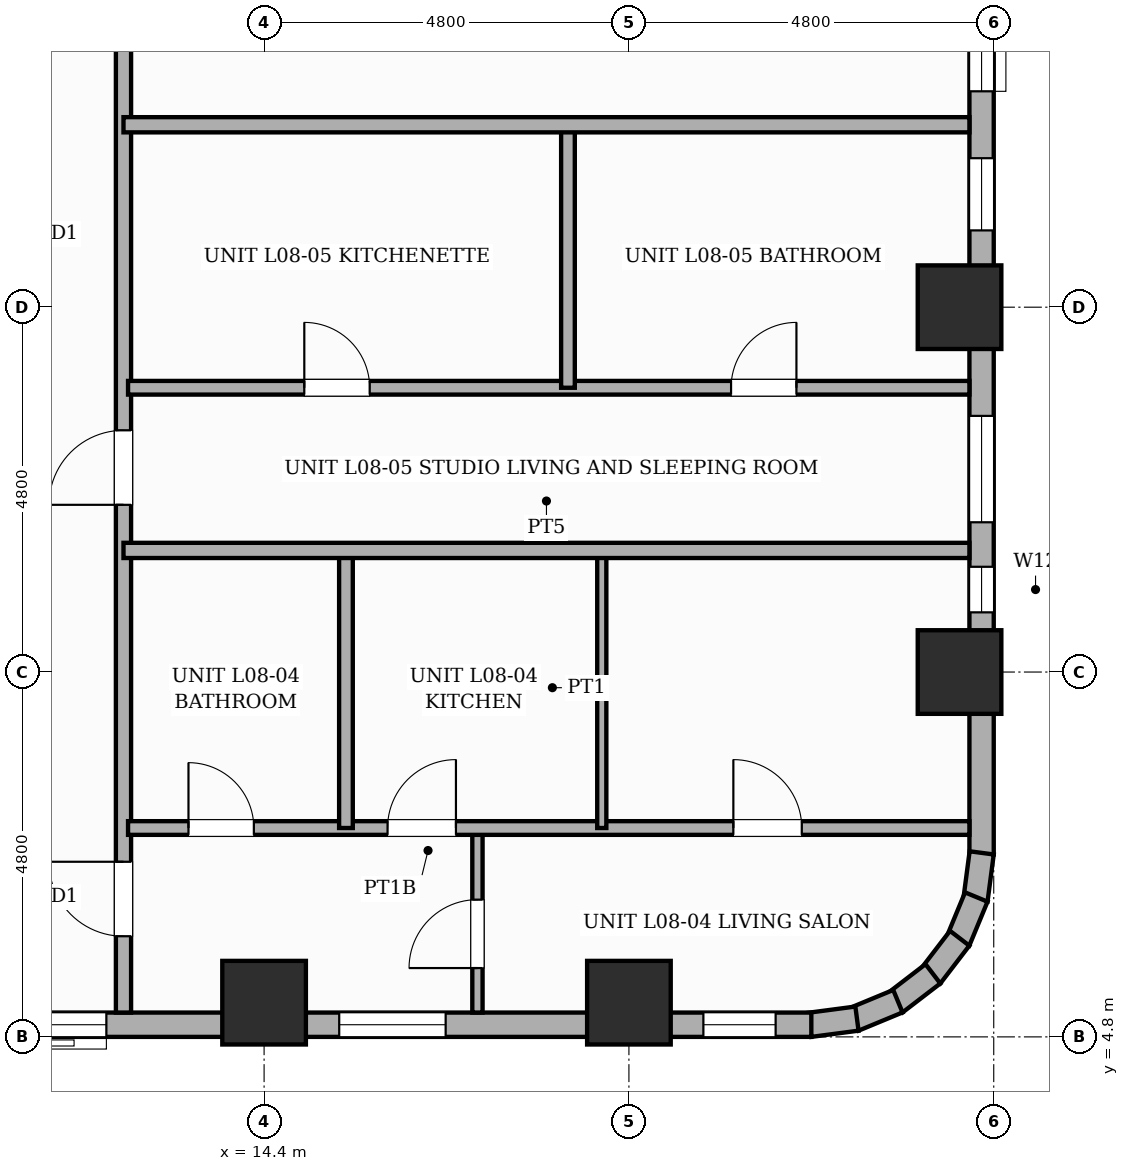
"""IFC4 building model, lengths in metres.
Left out: names, types, materials, properties, quantities, classifications, styles, units other than length and angle.
Written with IfcOpenShell. Run it as: python <this file> out.ifc"""

import sys

from ifc_helpers import new_model, si_unit, direction, frame, frame_2d, origin, origin_2d, place, context, subcontext, project, spatial, rectangle, extrude, element, fill, save


model = new_model("IFC4")
c1 = context("Model", 3, precision=1e-05, world=origin(), true_north=direction((0.0, 1.0)))
c2 = subcontext(c1, "Body", "Model", "MODEL_VIEW")
j1 = project(units=[si_unit("LENGTHUNIT", "METRE"), si_unit("PLANEANGLEUNIT", "RADIAN")], contexts=[c1])
p1 = place(None, origin())
s1 = spatial("IfcSite", under=j1, at=p1, CompositionType="ELEMENT")
p2 = place(p1, origin())
s2 = spatial("IfcBuilding", under=s1, at=p2, CompositionType="ELEMENT")
p3 = place(p2, frame((0.0, 0.0, 35.8)))
s3 = spatial("IfcBuildingStorey", under=s2, at=p3, CompositionType="ELEMENT", Elevation=35.8)
for number, where, z_axis, x_axis in (
    (1, (14.4, 5.25, 0.0), (0.0, 0.0, 1.0), (1.0, 0.0, 0.0)),
    (2, (19.2, 5.25, 0.0), (0.0, 0.0, 1.0), (1.0, 0.0, 0.0)),
    (3, (23.55, 9.6, 0.0), (0.0, 0.0, 1.0), (1.0, 0.0, 0.0)),
    (4, (23.55, 14.4, 0.0), (0.0, 0.0, 1.0), (1.0, 0.0, 0.0)),
):
    element("IfcColumn", number, at=place(p3, frame(where, z_axis=z_axis, x_axis=x_axis)), inside=s3, PredefinedType="COLUMN", context=c2, shape_type="SweptSolid", body=[
        extrude(rectangle(XDim=1.1, YDim=1.1, at=origin_2d()), origin(), (0.0, 0.0, 1.0), 3.6),
    ])
p4 = place(p3, frame((23.84, 26.4, 0.0), z_axis=(0.0, 0.0, 1.0), x_axis=(0.0, -1.0, 0.0)))
e5 = element("IfcWall", 5, at=p4, inside=s3, PredefinedType="STANDARD", context=c2, shape_type="SweptSolid", body=[
    extrude(rectangle(XDim=19.2, YDim=0.32, at=frame_2d((9.6, 0.0))), origin(), (0.0, 0.0, 1.0), 2.53),
])
p5 = place(p4, frame((15.415, 0.0, 0.45)))
e6 = element("IfcOpeningElement", 6, at=p5, cuts=e5, PredefinedType="OPENING", context=c2, shape_type="SweptSolid", body=[
    extrude(rectangle(XDim=0.6, YDim=1.8, at=frame_2d((0.3, 0.9))), frame((0.0, 0.17, 0.0), z_axis=(0.0, -1.0, 0.0), x_axis=(1.0, 0.0, 0.0)), (0.0, 0.0, 1.0), 0.34),
])
p6 = place(p4, frame((13.43, 0.0, 0.65)))
e7 = element("IfcOpeningElement", 7, at=p6, cuts=e5, PredefinedType="OPENING", context=c2, shape_type="SweptSolid", body=[
    extrude(rectangle(XDim=1.4, YDim=1.1, at=frame_2d((0.7, 0.55))), frame((0.0, 0.17, 0.0), z_axis=(0.0, -1.0, 0.0), x_axis=(1.0, 0.0, 0.0)), (0.0, 0.0, 1.0), 0.34),
])
p7 = place(p4, frame((8.21, 0.0, 0.45)))
e8 = element("IfcOpeningElement", 8, at=p7, cuts=e5, PredefinedType="OPENING", context=c2, shape_type="SweptSolid", body=[
    extrude(rectangle(XDim=0.95, YDim=1.8, at=frame_2d((0.475, 0.9))), frame((0.0, 0.17, 0.0), z_axis=(0.0, -1.0, 0.0), x_axis=(1.0, 0.0, 0.0)), (0.0, 0.0, 1.0), 0.34),
])
p8 = place(p4, frame((3.285, 0.0, 0.65)))
e9 = element("IfcOpeningElement", 9, at=p8, cuts=e5, PredefinedType="OPENING", context=c2, shape_type="SweptSolid", body=[
    extrude(rectangle(XDim=1.4, YDim=1.1, at=frame_2d((0.7, 0.55))), frame((0.0, 0.17, 0.0), z_axis=(0.0, -1.0, 0.0), x_axis=(1.0, 0.0, 0.0)), (0.0, 0.0, 1.0), 0.34),
])
p9 = place(p4, frame((10.04, 0.0, 0.45)))
e10 = element("IfcOpeningElement", 10, at=p9, cuts=e5, PredefinedType="OPENING", context=c2, shape_type="SweptSolid", body=[
    extrude(rectangle(XDim=0.95, YDim=1.8, at=frame_2d((0.475, 0.9))), frame((0.0, 0.17, 0.0), z_axis=(0.0, -1.0, 0.0), x_axis=(1.0, 0.0, 0.0)), (0.0, 0.0, 1.0), 0.34),
])
p10 = place(p4, frame((5.32, 0.0, 0.45)))
e11 = element("IfcOpeningElement", 11, at=p10, cuts=e5, PredefinedType="OPENING", context=c2, shape_type="SweptSolid", body=[
    extrude(rectangle(XDim=0.95, YDim=1.8, at=frame_2d((0.475, 0.9))), frame((0.0, 0.17, 0.0), z_axis=(0.0, -1.0, 0.0), x_axis=(1.0, 0.0, 0.0)), (0.0, 0.0, 1.0), 0.34),
])
p11 = place(p4, frame((0.88, 0.0, 0.45)))
e12 = element("IfcOpeningElement", 12, at=p11, cuts=e5, PredefinedType="OPENING", context=c2, shape_type="SweptSolid", body=[
    extrude(rectangle(XDim=0.75, YDim=1.8, at=frame_2d((0.375, 0.9))), frame((0.0, 0.17, 0.0), z_axis=(0.0, -1.0, 0.0), x_axis=(1.0, 0.0, 0.0)), (0.0, 0.0, 1.0), 0.34),
])
p12 = place(p3, frame((23.841, 7.221, 0.0), z_axis=(0.0, 0.0, 1.0), x_axis=(-0.130504898859, -0.991447664465, 0.0)))
e13 = element("IfcWall", 13, at=p12, inside=s3, PredefinedType="STANDARD", context=c2, shape_type="SweptSolid", body=[
    extrude(rectangle(XDim=0.627, YDim=0.32, at=frame_2d((0.313, 0.0))), origin(), (0.0, 0.0, 1.0), 3.35),
])
p13 = place(p3, frame((23.771, 6.64, 0.0), z_axis=(0.0, 0.0, 1.0), x_axis=(-0.382787856107, -0.923836271867, 0.0)))
e14 = element("IfcWall", 14, at=p13, inside=s3, PredefinedType="STANDARD", context=c2, shape_type="SweptSolid", body=[
    extrude(rectangle(XDim=0.626, YDim=0.32, at=frame_2d((0.313, 0.0))), origin(), (0.0, 0.0, 1.0), 3.35),
])
p14 = place(p3, frame((23.552, 6.097, 0.0), z_axis=(0.0, 0.0, 1.0), x_axis=(-0.608693302629, -0.793405610854, 0.0)))
e15 = element("IfcWall", 15, at=p14, inside=s3, PredefinedType="STANDARD", context=c2, shape_type="SweptSolid", body=[
    extrude(rectangle(XDim=0.626, YDim=0.32, at=frame_2d((0.313, 0.0))), origin(), (0.0, 0.0, 1.0), 3.35),
])
p15 = place(p3, frame((23.2, 5.63, 0.0), z_axis=(0.0, 0.0, 1.0), x_axis=(-0.7932174212, -0.608938521285, 0.0)))
e16 = element("IfcWall", 16, at=p15, inside=s3, PredefinedType="STANDARD", context=c2, shape_type="SweptSolid", body=[
    extrude(rectangle(XDim=0.627, YDim=0.32, at=frame_2d((0.313, 0.0))), origin(), (0.0, 0.0, 1.0), 3.35),
])
for number, where, z_axis, x_axis in (
    (17, (22.739, 5.269, 0.0), (0.0, 0.0, 1.0), (-0.924, -0.383, 0.0)),
    (18, (22.2, 5.04, 0.0), (0.0, 0.0, 1.0), (-0.991, -0.131, 0.0)),
):
    element("IfcWall", number, at=place(p3, frame(where, z_axis=z_axis, x_axis=x_axis)), inside=s3, PredefinedType="STANDARD", context=c2, shape_type="SweptSolid", body=[
        extrude(rectangle(XDim=0.626, YDim=0.32, at=frame_2d((0.313, 0.0))), origin(), (0.0, 0.0, 1.0), 3.35),
    ])
p16 = place(p3, frame((21.6, 4.96, 0.0), z_axis=(0.0, 0.0, 1.0), x_axis=(-1.0, 0.0, 0.0)))
e19 = element("IfcWall", 19, at=p16, inside=s3, PredefinedType="STANDARD", context=c2, shape_type="SweptSolid", body=[
    extrude(rectangle(XDim=14.4, YDim=0.32, at=frame_2d((7.2, 0.0))), origin(), (0.0, 0.0, 1.0), 2.53),
])
p17 = place(p16, frame((12.98, 0.0, 0.45)))
e20 = element("IfcOpeningElement", 20, at=p17, cuts=e19, PredefinedType="OPENING", context=c2, shape_type="SweptSolid", body=[
    extrude(rectangle(XDim=0.95, YDim=1.8, at=frame_2d((0.475, 0.9))), frame((0.0, 0.17, 0.0), z_axis=(0.0, -1.0, 0.0), x_axis=(1.0, 0.0, 0.0)), (0.0, 0.0, 1.0), 0.34),
])
p18 = place(p16, frame((9.275, 0.0, 0.65)))
e21 = element("IfcOpeningElement", 21, at=p18, cuts=e19, PredefinedType="OPENING", context=c2, shape_type="SweptSolid", body=[
    extrude(rectangle(XDim=1.4, YDim=1.1, at=frame_2d((0.7, 0.55))), frame((0.0, 0.17, 0.0), z_axis=(0.0, -1.0, 0.0), x_axis=(1.0, 0.0, 0.0)), (0.0, 0.0, 1.0), 0.34),
])
p19 = place(p16, frame((4.812, 0.0, 0.65)))
e22 = element("IfcOpeningElement", 22, at=p19, cuts=e19, PredefinedType="OPENING", context=c2, shape_type="SweptSolid", body=[
    extrude(rectangle(XDim=1.4, YDim=1.1, at=frame_2d((0.7, 0.55))), frame((0.0, 0.17, 0.0), z_axis=(0.0, -1.0, 0.0), x_axis=(1.0, 0.0, 0.0)), (0.0, 0.0, 1.0), 0.34),
])
p20 = place(p16, frame((0.47, 0.0, 0.45)))
e23 = element("IfcOpeningElement", 23, at=p20, cuts=e19, PredefinedType="OPENING", context=c2, shape_type="SweptSolid", body=[
    extrude(rectangle(XDim=0.95, YDim=1.8, at=frame_2d((0.475, 0.9))), frame((0.0, 0.17, 0.0), z_axis=(0.0, -1.0, 0.0), x_axis=(1.0, 0.0, 0.0)), (0.0, 0.0, 1.0), 0.34),
])
p21 = place(p3, frame((12.55, 5.12, 0.0), z_axis=(0.0, 0.0, 1.0), x_axis=(0.0, 1.0, 0.0)))
e24 = element("IfcWall", 24, at=p21, inside=s3, PredefinedType="PARTITIONING", context=c2, shape_type="SweptSolid", body=[
    extrude(rectangle(XDim=20.63, YDim=0.2, at=frame_2d((10.315, 0.0))), origin(), (0.0, 0.0, 1.0), 3.35),
])
p22 = place(p21, frame((1.004, 0.0, 0.0)))
e25 = element("IfcOpeningElement", 25, at=p22, cuts=e24, PredefinedType="OPENING", context=c2, shape_type="SweptSolid", body=[
    extrude(rectangle(XDim=0.98, YDim=2.18, at=frame_2d((0.49, 1.09))), frame((0.0, 0.11, 0.0), z_axis=(0.0, -1.0, 0.0), x_axis=(1.0, 0.0, 0.0)), (0.0, 0.0, 1.0), 0.22),
])
p23 = place(p21, frame((6.68, 0.0, 0.0)))
e26 = element("IfcOpeningElement", 26, at=p23, cuts=e24, PredefinedType="OPENING", context=c2, shape_type="SweptSolid", body=[
    extrude(rectangle(XDim=0.98, YDim=2.18, at=frame_2d((0.49, 1.09))), frame((0.0, 0.11, 0.0), z_axis=(0.0, -1.0, 0.0), x_axis=(1.0, 0.0, 0.0)), (0.0, 0.0, 1.0), 0.22),
])
p24 = place(p21, frame((12.715, 0.0, 0.0)))
e27 = element("IfcOpeningElement", 27, at=p24, cuts=e24, PredefinedType="OPENING", context=c2, shape_type="SweptSolid", body=[
    extrude(rectangle(XDim=0.98, YDim=2.18, at=frame_2d((0.49, 1.09))), frame((0.0, 0.11, 0.0), z_axis=(0.0, -1.0, 0.0), x_axis=(1.0, 0.0, 0.0)), (0.0, 0.0, 1.0), 0.22),
])
p25 = place(p21, frame((16.88, 0.0, 0.0)))
e28 = element("IfcOpeningElement", 28, at=p25, cuts=e24, PredefinedType="OPENING", context=c2, shape_type="SweptSolid", body=[
    extrude(rectangle(XDim=0.98, YDim=2.18, at=frame_2d((0.49, 1.09))), frame((0.0, 0.11, 0.0), z_axis=(0.0, -1.0, 0.0), x_axis=(1.0, 0.0, 0.0)), (0.0, 0.0, 1.0), 0.22),
])
p26 = place(p3, frame((17.207, 5.12, 0.0), z_axis=(0.0, 0.0, 1.0), x_axis=(0.0, 1.0, 0.0)))
e29 = element("IfcWall", 29, at=p26, inside=s3, PredefinedType="PARTITIONING", context=c2, shape_type="SweptSolid", body=[
    extrude(rectangle(XDim=2.428, YDim=0.135, at=frame_2d((1.214, 0.0))), origin(), (0.0, 0.0, 1.0), 3.35),
])
p27 = place(p26, frame((0.586, 0.0, 0.0)))
e30 = element("IfcOpeningElement", 30, at=p27, cuts=e29, PredefinedType="OPENING", context=c2, shape_type="SweptSolid", body=[
    extrude(rectangle(XDim=0.9, YDim=2.15, at=frame_2d((0.45, 1.075))), frame((0.0, 0.078, 0.0), z_axis=(0.0, -1.0, 0.0), x_axis=(1.0, 0.0, 0.0)), (0.0, 0.0, 1.0), 0.155),
])
p28 = place(p3, frame((12.61, 7.548, 0.0), z_axis=(0.0, 0.0, 1.0), x_axis=(1.0, 0.0, 0.0)))
e31 = element("IfcWall", 31, at=p28, inside=s3, PredefinedType="PLUMBINGWALL", context=c2, shape_type="SweptSolid", body=[
    extrude(rectangle(XDim=11.07, YDim=0.18, at=frame_2d((5.535, 0.0))), origin(), (0.0, 0.0, 1.0), 3.35),
])
p29 = place(p28, frame((0.795, 0.0, 0.0)))
e32 = element("IfcOpeningElement", 32, at=p29, cuts=e31, PredefinedType="OPENING", context=c2, shape_type="SweptSolid", body=[
    extrude(rectangle(XDim=0.86, YDim=2.1, at=frame_2d((0.43, 1.05))), frame((0.0, 0.1, 0.0), z_axis=(0.0, -1.0, 0.0), x_axis=(1.0, 0.0, 0.0)), (0.0, 0.0, 1.0), 0.2),
])
p30 = place(p28, frame((3.414, 0.0, 0.0)))
e33 = element("IfcOpeningElement", 33, at=p30, cuts=e31, PredefinedType="OPENING", context=c2, shape_type="SweptSolid", body=[
    extrude(rectangle(XDim=0.9, YDim=2.15, at=frame_2d((0.45, 1.075))), frame((0.0, 0.1, 0.0), z_axis=(0.0, -1.0, 0.0), x_axis=(1.0, 0.0, 0.0)), (0.0, 0.0, 1.0), 0.2),
])
p31 = place(p28, frame((7.964, 0.0, 0.0)))
e34 = element("IfcOpeningElement", 34, at=p31, cuts=e31, PredefinedType="OPENING", context=c2, shape_type="SweptSolid", body=[
    extrude(rectangle(XDim=0.9, YDim=2.15, at=frame_2d((0.45, 1.075))), frame((0.0, 0.1, 0.0), z_axis=(0.0, -1.0, 0.0), x_axis=(1.0, 0.0, 0.0)), (0.0, 0.0, 1.0), 0.2),
])
p32 = place(p3, frame((15.477, 7.548, 0.0), z_axis=(0.0, 0.0, 1.0), x_axis=(0.0, 1.0, 0.0)))
e35 = element("IfcWall", 35, at=p32, inside=s3, PredefinedType="PLUMBINGWALL", context=c2, shape_type="SweptSolid", body=[
    extrude(rectangle(XDim=3.692, YDim=0.18, at=frame_2d((1.846, 0.0))), origin(), (0.0, 0.0, 1.0), 3.35),
])
p33 = place(p3, frame((18.843, 7.548, 0.0), z_axis=(0.0, 0.0, 1.0), x_axis=(0.0, 1.0, 0.0)))
e36 = element("IfcWall", 36, at=p33, inside=s3, PredefinedType="PARTITIONING", context=c2, shape_type="SweptSolid", body=[
    extrude(rectangle(XDim=3.692, YDim=0.12, at=frame_2d((1.846, 0.0))), origin(), (0.0, 0.0, 1.0), 3.35),
])
p34 = place(p3, frame((12.55, 11.2, 0.0), z_axis=(0.0, 0.0, 1.0), x_axis=(1.0, 0.0, 0.0)))
e37 = element("IfcWall", 37, at=p34, inside=s3, PredefinedType="SOLIDWALL", context=c2, shape_type="SweptSolid", body=[
    extrude(rectangle(XDim=11.13, YDim=0.2, at=frame_2d((5.565, 0.0))), origin(), (0.0, 0.0, 1.0), 3.35),
])
p35 = place(p3, frame((12.61, 13.34, 0.0), z_axis=(0.0, 0.0, 1.0), x_axis=(1.0, 0.0, 0.0)))
e38 = element("IfcWall", 38, at=p35, inside=s3, PredefinedType="PLUMBINGWALL", context=c2, shape_type="SweptSolid", body=[
    extrude(rectangle(XDim=11.07, YDim=0.18, at=frame_2d((5.535, 0.0))), origin(), (0.0, 0.0, 1.0), 3.35),
])
p36 = place(p35, frame((2.319, 0.0, 0.0)))
e39 = element("IfcOpeningElement", 39, at=p36, cuts=e38, PredefinedType="OPENING", context=c2, shape_type="SweptSolid", body=[
    extrude(rectangle(XDim=0.86, YDim=2.1, at=frame_2d((0.43, 1.05))), frame((0.0, 0.1, 0.0), z_axis=(0.0, -1.0, 0.0), x_axis=(1.0, 0.0, 0.0)), (0.0, 0.0, 1.0), 0.2),
])
p37 = place(p35, frame((7.934, 0.0, 0.0)))
e40 = element("IfcOpeningElement", 40, at=p37, cuts=e38, PredefinedType="OPENING", context=c2, shape_type="SweptSolid", body=[
    extrude(rectangle(XDim=0.86, YDim=2.1, at=frame_2d((0.43, 1.05))), frame((0.0, 0.1, 0.0), z_axis=(0.0, -1.0, 0.0), x_axis=(1.0, 0.0, 0.0)), (0.0, 0.0, 1.0), 0.2),
])
p38 = place(p3, frame((18.398, 13.34, 0.0), z_axis=(0.0, 0.0, 1.0), x_axis=(0.0, 1.0, 0.0)))
e41 = element("IfcWall", 41, at=p38, inside=s3, PredefinedType="PLUMBINGWALL", context=c2, shape_type="SweptSolid", body=[
    extrude(rectangle(XDim=3.5, YDim=0.18, at=frame_2d((1.75, 0.0))), origin(), (0.0, 0.0, 1.0), 3.35),
])
p39 = place(p3, frame((12.55, 16.8, 0.0), z_axis=(0.0, 0.0, 1.0), x_axis=(1.0, 0.0, 0.0)))
e42 = element("IfcWall", 42, at=p39, inside=s3, PredefinedType="SOLIDWALL", context=c2, shape_type="SweptSolid", body=[
    extrude(rectangle(XDim=11.13, YDim=0.2, at=frame_2d((5.565, 0.0))), origin(), (0.0, 0.0, 1.0), 3.35),
])
p40 = place(p5, origin())
e43 = element("IfcWindow", 43, at=p40, inside=s3, PartitioningType="SINGLE_PANEL", PredefinedType="WINDOW", context=c2, shape_type="SweptSolid", body=[
    extrude(rectangle(XDim=0.6, YDim=1.8, at=frame_2d((0.3, 0.9))), frame((0.0, 0.03, 0.0), z_axis=(0.0, -1.0, 0.0), x_axis=(1.0, 0.0, 0.0)), (0.0, 0.0, 1.0), 0.06),
])
fill(e6, e43)
p41 = place(p6, origin())
e44 = element("IfcWindow", 44, at=p41, inside=s3, PartitioningType="SINGLE_PANEL", PredefinedType="WINDOW", context=c2, shape_type="SweptSolid", body=[
    extrude(rectangle(XDim=1.4, YDim=1.1, at=frame_2d((0.7, 0.55))), frame((0.0, 0.03, 0.0), z_axis=(0.0, -1.0, 0.0), x_axis=(1.0, 0.0, 0.0)), (0.0, 0.0, 1.0), 0.06),
])
fill(e7, e44)
p42 = place(p7, origin())
e45 = element("IfcWindow", 45, at=p42, inside=s3, PartitioningType="SINGLE_PANEL", PredefinedType="WINDOW", context=c2, shape_type="SweptSolid", body=[
    extrude(rectangle(XDim=0.95, YDim=1.8, at=frame_2d((0.475, 0.9))), frame((0.0, 0.03, 0.0), z_axis=(0.0, -1.0, 0.0), x_axis=(1.0, 0.0, 0.0)), (0.0, 0.0, 1.0), 0.06),
])
fill(e8, e45)
p43 = place(p9, origin())
e46 = element("IfcWindow", 46, at=p43, inside=s3, PartitioningType="SINGLE_PANEL", PredefinedType="WINDOW", context=c2, shape_type="SweptSolid", body=[
    extrude(rectangle(XDim=0.95, YDim=1.8, at=frame_2d((0.475, 0.9))), frame((0.0, 0.03, 0.0), z_axis=(0.0, -1.0, 0.0), x_axis=(1.0, 0.0, 0.0)), (0.0, 0.0, 1.0), 0.06),
])
fill(e10, e46)
p44 = place(p18, origin())
e47 = element("IfcWindow", 47, at=p44, inside=s3, PartitioningType="SINGLE_PANEL", PredefinedType="WINDOW", context=c2, shape_type="SweptSolid", body=[
    extrude(rectangle(XDim=1.4, YDim=1.1, at=frame_2d((0.7, 0.55))), frame((0.0, 0.03, 0.0), z_axis=(0.0, -1.0, 0.0), x_axis=(1.0, 0.0, 0.0)), (0.0, 0.0, 1.0), 0.06),
])
fill(e21, e47)
p45 = place(p19, origin())
e48 = element("IfcWindow", 48, at=p45, inside=s3, PartitioningType="SINGLE_PANEL", PredefinedType="WINDOW", context=c2, shape_type="SweptSolid", body=[
    extrude(rectangle(XDim=1.4, YDim=1.1, at=frame_2d((0.7, 0.55))), frame((0.0, 0.03, 0.0), z_axis=(0.0, -1.0, 0.0), x_axis=(1.0, 0.0, 0.0)), (0.0, 0.0, 1.0), 0.06),
])
fill(e22, e48)
p46 = place(p20, origin())
e49 = element("IfcWindow", 49, at=p46, inside=s3, PartitioningType="SINGLE_PANEL", PredefinedType="WINDOW", context=c2, shape_type="SweptSolid", body=[
    extrude(rectangle(XDim=0.95, YDim=1.8, at=frame_2d((0.475, 0.9))), frame((0.0, 0.03, 0.0), z_axis=(0.0, -1.0, 0.0), x_axis=(1.0, 0.0, 0.0)), (0.0, 0.0, 1.0), 0.06),
])
fill(e23, e49)
p47 = place(p22, origin())
e50 = element("IfcDoor", 50, at=p47, inside=s3, OperationType="SINGLE_SWING_RIGHT", PredefinedType="DOOR", context=c2, shape_type="SweptSolid", body=[
    extrude(rectangle(XDim=0.98, YDim=2.18, at=frame_2d((0.49, 1.09))), frame((0.0, 0.025, 0.0), z_axis=(0.0, -1.0, 0.0), x_axis=(1.0, 0.0, 0.0)), (0.0, 0.0, 1.0), 0.05),
])
fill(e25, e50)
p48 = place(p27, origin())
e51 = element("IfcDoor", 51, at=p48, inside=s3, OperationType="SINGLE_SWING_LEFT", PredefinedType="DOOR", context=c2, shape_type="SweptSolid", body=[
    extrude(rectangle(XDim=0.9, YDim=2.15, at=frame_2d((0.45, 1.075))), frame((0.0, 0.025, 0.0), z_axis=(0.0, -1.0, 0.0), x_axis=(1.0, 0.0, 0.0)), (0.0, 0.0, 1.0), 0.05),
])
fill(e30, e51)
p49 = place(p29, origin())
e52 = element("IfcDoor", 52, at=p49, inside=s3, OperationType="SINGLE_SWING_LEFT", PredefinedType="DOOR", context=c2, shape_type="SweptSolid", body=[
    extrude(rectangle(XDim=0.86, YDim=2.1, at=frame_2d((0.43, 1.05))), frame((0.0, 0.025, 0.0), z_axis=(0.0, -1.0, 0.0), x_axis=(1.0, 0.0, 0.0)), (0.0, 0.0, 1.0), 0.05),
])
fill(e32, e52)
p50 = place(p30, origin())
e53 = element("IfcDoor", 53, at=p50, inside=s3, OperationType="SINGLE_SWING_RIGHT", PredefinedType="DOOR", context=c2, shape_type="SweptSolid", body=[
    extrude(rectangle(XDim=0.9, YDim=2.15, at=frame_2d((0.45, 1.075))), frame((0.0, 0.025, 0.0), z_axis=(0.0, -1.0, 0.0), x_axis=(1.0, 0.0, 0.0)), (0.0, 0.0, 1.0), 0.05),
])
fill(e33, e53)
p51 = place(p31, origin())
e54 = element("IfcDoor", 54, at=p51, inside=s3, OperationType="SINGLE_SWING_LEFT", PredefinedType="DOOR", context=c2, shape_type="SweptSolid", body=[
    extrude(rectangle(XDim=0.9, YDim=2.15, at=frame_2d((0.45, 1.075))), frame((0.0, 0.025, 0.0), z_axis=(0.0, -1.0, 0.0), x_axis=(1.0, 0.0, 0.0)), (0.0, 0.0, 1.0), 0.05),
])
fill(e34, e54)
p52 = place(p23, origin())
e55 = element("IfcDoor", 55, at=p52, inside=s3, OperationType="SINGLE_SWING_LEFT", PredefinedType="DOOR", context=c2, shape_type="SweptSolid", body=[
    extrude(rectangle(XDim=0.98, YDim=2.18, at=frame_2d((0.49, 1.09))), frame((0.0, 0.025, 0.0), z_axis=(0.0, -1.0, 0.0), x_axis=(1.0, 0.0, 0.0)), (0.0, 0.0, 1.0), 0.05),
])
fill(e26, e55)
p53 = place(p36, origin())
e56 = element("IfcDoor", 56, at=p53, inside=s3, OperationType="SINGLE_SWING_LEFT", PredefinedType="DOOR", context=c2, shape_type="SweptSolid", body=[
    extrude(rectangle(XDim=0.86, YDim=2.1, at=frame_2d((0.43, 1.05))), frame((0.0, 0.025, 0.0), z_axis=(0.0, -1.0, 0.0), x_axis=(1.0, 0.0, 0.0)), (0.0, 0.0, 1.0), 0.05),
])
fill(e39, e56)
p54 = place(p37, origin())
e57 = element("IfcDoor", 57, at=p54, inside=s3, OperationType="SINGLE_SWING_RIGHT", PredefinedType="DOOR", context=c2, shape_type="SweptSolid", body=[
    extrude(rectangle(XDim=0.86, YDim=2.1, at=frame_2d((0.43, 1.05))), frame((0.0, 0.025, 0.0), z_axis=(0.0, -1.0, 0.0), x_axis=(1.0, 0.0, 0.0)), (0.0, 0.0, 1.0), 0.05),
])
fill(e40, e57)
save(model, sys.argv[1])
